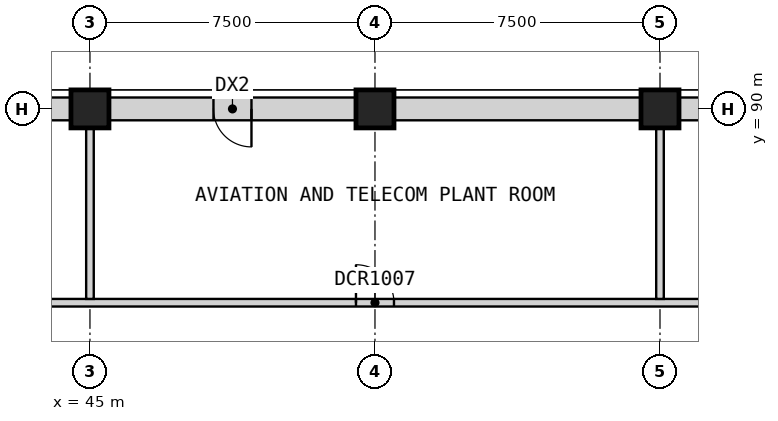
"""IFC4 building model, lengths in metres.
Left out: names, types, materials, properties, quantities, classifications, styles, units other than length and angle.
Written with IfcOpenShell. Run it as: python <this file> out.ifc"""

import sys

from ifc_helpers import new_model, si_unit, direction, frame, frame_2d, origin, origin_2d, place, context, subcontext, project, spatial, rectangle, extrude, element, fill, save


model = new_model("IFC4")
c1 = context("Model", 3, precision=1e-05, world=origin(), true_north=direction((0.0, 1.0)))
c2 = subcontext(c1, "Body", "Model", "MODEL_VIEW")
j1 = project(units=[si_unit("LENGTHUNIT", "METRE"), si_unit("PLANEANGLEUNIT", "RADIAN")], contexts=[c1])
p1 = place(None, origin())
s1 = spatial("IfcSite", under=j1, at=p1, CompositionType="ELEMENT")
p2 = place(p1, origin())
s2 = spatial("IfcBuilding", under=s1, at=p2, CompositionType="ELEMENT")
p3 = place(p2, frame((0.0, 0.0, 320.2)))
s3 = spatial("IfcBuildingStorey", under=s2, at=p3, CompositionType="ELEMENT", Elevation=320.2)
for number, where, z_axis, x_axis in (
    (1, (45.0, 90.0, 0.0), (0.0, 0.0, 1.0), (1.0, 0.0, 0.0)),
    (2, (52.5, 90.0, 0.0), (0.0, 0.0, 1.0), (1.0, 0.0, 0.0)),
    (3, (60.0, 90.0, 0.0), (0.0, 0.0, 1.0), (1.0, 0.0, 0.0)),
):
    element("IfcColumn", number, at=place(p3, frame(where, z_axis=z_axis, x_axis=x_axis)), inside=s3, PredefinedType="COLUMN", context=c2, shape_type="SweptSolid", body=[
        extrude(rectangle(XDim=1.0, YDim=1.0, at=origin_2d()), origin(), (0.0, 0.0, 1.0), 8.0),
    ])
p4 = place(p3, frame((66.0, 90.0, 0.0), z_axis=(0.0, 0.0, 1.0), x_axis=(-1.0, 0.0, 0.0)))
e4 = element("IfcWall", 4, at=p4, inside=s3, PredefinedType="ELEMENTEDWALL", context=c2, shape_type="SweptSolid", body=[
    extrude(rectangle(XDim=5.5, YDim=0.6, at=frame_2d((2.75, 0.0))), origin(), (0.0, 0.0, 1.0), 7.7),
])
p5 = place(p3, frame((59.5, 90.0, 0.0), z_axis=(0.0, 0.0, 1.0), x_axis=(-1.0, 0.0, 0.0)))
e5 = element("IfcWall", 5, at=p5, inside=s3, PredefinedType="ELEMENTEDWALL", context=c2, shape_type="SweptSolid", body=[
    extrude(rectangle(XDim=6.5, YDim=0.6, at=frame_2d((3.25, 0.0))), origin(), (0.0, 0.0, 1.0), 6.8),
])
p6 = place(p3, frame((52.0, 90.0, 0.0), z_axis=(0.0, 0.0, 1.0), x_axis=(-1.0, 0.0, 0.0)))
e6 = element("IfcWall", 6, at=p6, inside=s3, PredefinedType="ELEMENTEDWALL", context=c2, shape_type="SweptSolid", body=[
    extrude(rectangle(XDim=6.5, YDim=0.6, at=frame_2d((3.25, 0.0))), origin(), (0.0, 0.0, 1.0), 6.8),
])
p7 = place(p6, frame((2.75, 0.0, 0.0)))
e7 = element("IfcOpeningElement", 7, at=p7, cuts=e6, PredefinedType="OPENING", context=c2, shape_type="SweptSolid", body=[
    extrude(rectangle(XDim=1.0, YDim=2.1, at=frame_2d((0.5, 1.05))), frame((0.0, 0.31, 0.0), z_axis=(0.0, -1.0, 0.0), x_axis=(1.0, 0.0, 0.0)), (0.0, 0.0, 1.0), 0.62),
])
p8 = place(p3, frame((44.5, 90.0, 0.0), z_axis=(0.0, 0.0, 1.0), x_axis=(-1.0, 0.0, 0.0)))
e8 = element("IfcWall", 8, at=p8, inside=s3, PredefinedType="ELEMENTEDWALL", context=c2, shape_type="SweptSolid", body=[
    extrude(rectangle(XDim=5.5, YDim=0.6, at=frame_2d((2.75, 0.0))), origin(), (0.0, 0.0, 1.0), 6.8),
])
p9 = place(p3, frame((33.75, 84.9, 0.0), z_axis=(0.0, 0.0, 1.0), x_axis=(1.0, 0.0, 0.0)))
e9 = element("IfcWall", 9, at=p9, inside=s3, PredefinedType="PARTITIONING", context=c2, shape_type="SweptSolid", body=[
    extrude(rectangle(XDim=28.65, YDim=0.2, at=frame_2d((14.325, 0.0))), origin(), (0.0, 0.0, 1.0), 7.7),
])
p10 = place(p9, frame((1.375, 0.0, 0.0)))
e10 = element("IfcOpeningElement", 10, at=p10, cuts=e9, PredefinedType="OPENING", context=c2, shape_type="SweptSolid", body=[
    extrude(rectangle(XDim=1.0, YDim=2.1, at=frame_2d((0.5, 1.05))), frame((0.0, 0.11, 0.0), z_axis=(0.0, -1.0, 0.0), x_axis=(1.0, 0.0, 0.0)), (0.0, 0.0, 1.0), 0.22),
])
p11 = place(p9, frame((7.0, 0.0, 0.0)))
e11 = element("IfcOpeningElement", 11, at=p11, cuts=e9, PredefinedType="OPENING", context=c2, shape_type="SweptSolid", body=[
    extrude(rectangle(XDim=1.0, YDim=2.1, at=frame_2d((0.5, 1.05))), frame((0.0, 0.11, 0.0), z_axis=(0.0, -1.0, 0.0), x_axis=(1.0, 0.0, 0.0)), (0.0, 0.0, 1.0), 0.22),
])
p12 = place(p9, frame((18.25, 0.0, 0.0)))
e12 = element("IfcOpeningElement", 12, at=p12, cuts=e9, PredefinedType="OPENING", context=c2, shape_type="SweptSolid", body=[
    extrude(rectangle(XDim=1.0, YDim=2.1, at=frame_2d((0.5, 1.05))), frame((0.0, 0.11, 0.0), z_axis=(0.0, -1.0, 0.0), x_axis=(1.0, 0.0, 0.0)), (0.0, 0.0, 1.0), 0.22),
])
p13 = place(p3, frame((45.0, 85.0, 0.0), z_axis=(0.0, 0.0, 1.0), x_axis=(0.0, 1.0, 0.0)))
e13 = element("IfcWall", 13, at=p13, inside=s3, PredefinedType="PARTITIONING", context=c2, shape_type="SweptSolid", body=[
    extrude(rectangle(XDim=5.5, YDim=0.2, at=frame_2d((2.75, 0.0))), origin(), (0.0, 0.0, 1.0), 7.7),
])
p14 = place(p3, frame((60.0, 85.0, 0.0), z_axis=(0.0, 0.0, 1.0), x_axis=(0.0, 1.0, 0.0)))
e14 = element("IfcWall", 14, at=p14, inside=s3, PredefinedType="PARTITIONING", context=c2, shape_type="SweptSolid", body=[
    extrude(rectangle(XDim=5.5, YDim=0.2, at=frame_2d((2.75, 0.0))), origin(), (0.0, 0.0, 1.0), 6.2),
])
p15 = place(p7, origin())
e15 = element("IfcDoor", 15, at=p15, inside=s3, OperationType="SINGLE_SWING_LEFT", PredefinedType="DOOR", context=c2, shape_type="SweptSolid", body=[
    extrude(rectangle(XDim=1.0, YDim=2.1, at=frame_2d((0.5, 1.05))), frame((0.0, 0.025, 0.0), z_axis=(0.0, -1.0, 0.0), x_axis=(1.0, 0.0, 0.0)), (0.0, 0.0, 1.0), 0.05),
])
fill(e7, e15)
p16 = place(p12, origin())
e16 = element("IfcDoor", 16, at=p16, inside=s3, OperationType="SINGLE_SWING_LEFT", PredefinedType="DOOR", context=c2, shape_type="SweptSolid", body=[
    extrude(rectangle(XDim=1.0, YDim=2.1, at=frame_2d((0.5, 1.05))), frame((0.0, 0.025, 0.0), z_axis=(0.0, -1.0, 0.0), x_axis=(1.0, 0.0, 0.0)), (0.0, 0.0, 1.0), 0.05),
])
fill(e12, e16)
save(model, sys.argv[1])
